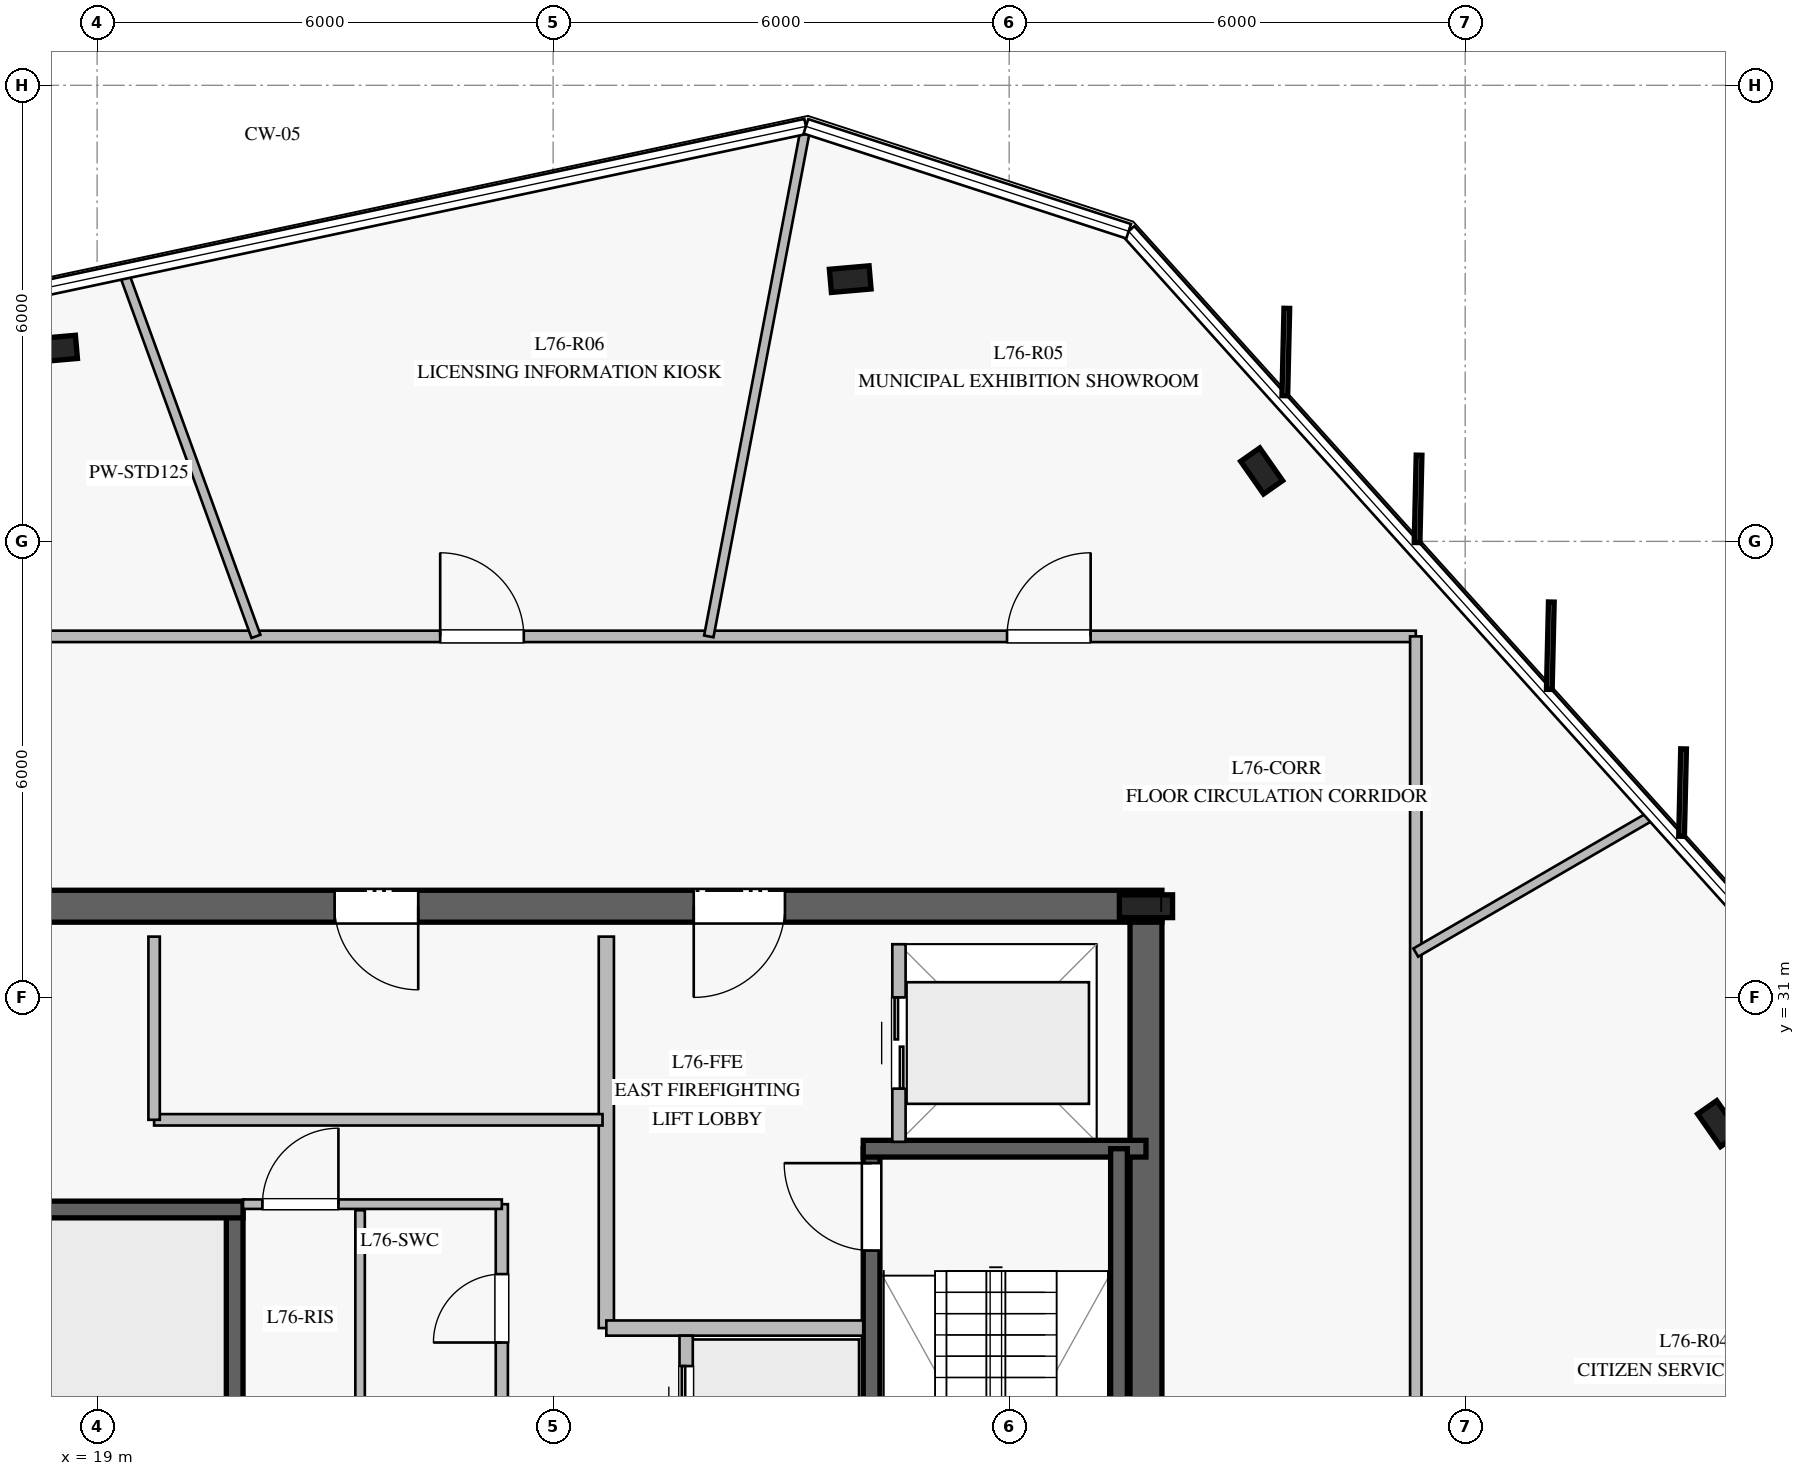
"""IFC4 building model, lengths in metres.
Left out: names, types, materials, properties, quantities, classifications, styles, units other than length and angle.
Written with IfcOpenShell. Run it as: python <this file> out.ifc"""

import sys

from ifc_helpers import new_model, si_unit, direction, frame, frame_2d, origin, origin_2d, place, context, subcontext, project, spatial, rectangle, i_section, extrude, element, fill, save


model = new_model("IFC4")
c1 = context("Model", 3, precision=1e-05, world=origin(), true_north=direction((0.0, 1.0)))
c2 = subcontext(c1, "Body", "Model", "MODEL_VIEW")
j1 = project(units=[si_unit("LENGTHUNIT", "METRE"), si_unit("PLANEANGLEUNIT", "RADIAN")], contexts=[c1])
p1 = place(None, origin())
s1 = spatial("IfcSite", under=j1, at=p1, CompositionType="ELEMENT")
p2 = place(p1, origin())
s2 = spatial("IfcBuilding", under=s1, at=p2, CompositionType="ELEMENT")
p3 = place(p2, frame((0.0, 0.0, 314.2)))
s3 = spatial("IfcBuildingStorey", under=s2, at=p3, CompositionType="ELEMENT", Elevation=314.2)
p4 = place(p3, frame((33.01, 32.2, 0.0), z_axis=(0.0, 0.0, 1.0), x_axis=(-1.0, 0.0, 0.0)))
e1 = element("IfcWall", 1, at=p4, inside=s3, PredefinedType="SHEAR", context=c2, shape_type="SweptSolid", body=[
    extrude(rectangle(XDim=16.02, YDim=0.42, at=frame_2d((8.01, 0.0))), origin(), (0.0, 0.0, 1.0), 3.74),
])
p5 = place(p4, frame((4.96, 0.0, 0.0)))
e2 = element("IfcOpeningElement", 2, at=p5, cuts=e1, PredefinedType="OPENING", context=c2, shape_type="SweptSolid", body=[
    extrude(rectangle(XDim=1.2, YDim=2.25, at=frame_2d((0.6, 1.125))), frame((0.0, 0.22, 0.0), z_axis=(0.0, -1.0, 0.0), x_axis=(1.0, 0.0, 0.0)), (0.0, 0.0, 1.0), 0.44),
])
p6 = place(p4, frame((9.785, 0.0, 0.0)))
e3 = element("IfcOpeningElement", 3, at=p6, cuts=e1, PredefinedType="OPENING", context=c2, shape_type="SweptSolid", body=[
    extrude(rectangle(XDim=1.1, YDim=2.2, at=frame_2d((0.55, 1.1))), frame((0.0, 0.22, 0.0), z_axis=(0.0, -1.0, 0.0), x_axis=(1.0, 0.0, 0.0)), (0.0, 0.0, 1.0), 0.44),
])
p7 = place(p3, frame((32.8, 18.01, 0.0), z_axis=(0.0, 0.0, 1.0), x_axis=(0.0, 1.0, 0.0)))
e4 = element("IfcWall", 4, at=p7, inside=s3, PredefinedType="SHEAR", context=c2, shape_type="SweptSolid", body=[
    extrude(rectangle(XDim=13.98, YDim=0.42, at=frame_2d((6.99, 0.0))), origin(), (0.0, 0.0, 1.0), 3.74),
])
p8 = place(p3, frame((32.8, 32.2, 0.0), z_axis=(0.0, 0.0, 1.0), x_axis=(1.0, 0.0, 0.0)))
e5 = element("IfcColumn", 5, at=p8, inside=s3, PredefinedType="COLUMN", context=c2, shape_type="SweptSolid", body=[
    extrude(i_section(OverallWidth=0.3, OverallDepth=0.7, WebThickness=0.017, FlangeThickness=0.032, at=origin_2d()), origin(), (0.0, 0.0, 1.0), 4.0),
])
p9 = place(p3, frame((20.81, 20.99, 0.0), z_axis=(0.0, 0.0, 1.0), x_axis=(0.0, 1.0, 0.0)))
e6 = element("IfcWall", 6, at=p9, inside=s3, PredefinedType="SOLIDWALL", context=c2, shape_type="SweptSolid", body=[
    extrude(rectangle(XDim=7.22, YDim=0.22, at=frame_2d((3.61, 0.0))), origin(), (0.0, 0.0, 1.0), 3.74),
])
p10 = place(p9, frame((0.18, 0.0, 0.0)))
e7 = element("IfcOpeningElement", 7, at=p10, cuts=e6, PredefinedType="OPENING", context=c2, shape_type="SweptSolid", body=[
    extrude(rectangle(XDim=1.15, YDim=2.2, at=frame_2d((0.575, 1.1))), frame((0.0, 0.12, 0.0), z_axis=(0.0, -1.0, 0.0), x_axis=(1.0, 0.0, 0.0)), (0.0, 0.0, 1.0), 0.24),
])
p11 = place(p3, frame((17.2, 28.21, 0.0), z_axis=(0.0, 0.0, 1.0), x_axis=(1.0, 0.0, 0.0)))
e8 = element("IfcWall", 8, at=p11, inside=s3, PredefinedType="SOLIDWALL", context=c2, shape_type="SweptSolid", body=[
    extrude(rectangle(XDim=3.72, YDim=0.22, at=frame_2d((1.86, 0.0))), origin(), (0.0, 0.0, 1.0), 3.74),
])
p12 = place(p3, frame((29.19, 21.79, 0.0), z_axis=(0.0, 0.0, 1.0), x_axis=(0.0, 1.0, 0.0)))
e9 = element("IfcWall", 9, at=p12, inside=s3, PredefinedType="SOLIDWALL", context=c2, shape_type="SweptSolid", body=[
    extrude(rectangle(XDim=7.22, YDim=0.22, at=frame_2d((3.61, 0.0))), origin(), (0.0, 0.0, 1.0), 3.74),
])
p13 = place(p12, frame((5.88, 0.0, 0.0)))
e10 = element("IfcOpeningElement", 10, at=p13, cuts=e9, PredefinedType="OPENING", context=c2, shape_type="SweptSolid", body=[
    extrude(rectangle(XDim=1.15, YDim=2.2, at=frame_2d((0.575, 1.1))), frame((0.0, 0.12, 0.0), z_axis=(0.0, -1.0, 0.0), x_axis=(1.0, 0.0, 0.0)), (0.0, 0.0, 1.0), 0.24),
])
p14 = place(p3, frame((29.08, 29.01, 0.0), z_axis=(0.0, 0.0, 1.0), x_axis=(1.0, 0.0, 0.0)))
e11 = element("IfcWall", 11, at=p14, inside=s3, PredefinedType="SOLIDWALL", context=c2, shape_type="SweptSolid", body=[
    extrude(rectangle(XDim=3.72, YDim=0.22, at=frame_2d((1.86, 0.0))), origin(), (0.0, 0.0, 1.0), 3.74),
])
p15 = place(p3, frame((32.445, 29.01, 0.0), z_axis=(0.0, 0.0, 1.0), x_axis=(0.0, -1.0, 0.0)))
e12 = element("IfcWall", 12, at=p15, inside=s3, PredefinedType="SOLIDWALL", context=c2, shape_type="SweptSolid", body=[
    extrude(rectangle(XDim=7.22, YDim=0.22, at=frame_2d((3.61, 0.0))), origin(), (0.0, 0.0, 1.0), 3.74),
])
for number, where, z_axis, x_axis in (
    (13, (28.909, 40.45, 0.0), (0.0, 0.0, 1.0), (0.996, 0.087, 0.0)),
    (14, (18.467, 39.536, 0.0), (0.0, 0.0, 1.0), (0.996, 0.087, 0.0)),
    (15, (40.334, 29.339, 0.0), (0.0, 0.0, 1.0), (-0.574, 0.819, 0.0)),
    (16, (34.322, 37.926, 0.0), (0.0, 0.0, 1.0), (-0.574, 0.819, 0.0)),
):
    element("IfcColumn", number, at=place(p3, frame(where, z_axis=z_axis, x_axis=x_axis)), inside=s3, PredefinedType="COLUMN", context=c2, shape_type="SweptSolid", body=[
        extrude(i_section(OverallWidth=0.306, OverallDepth=0.524, WebThickness=0.021, FlangeThickness=0.04, at=origin_2d()), origin(), (0.0, 0.0, 1.0), 4.0),
    ])
p16 = place(p3, frame((25.7, 26.65, 0.0), z_axis=(0.0, 0.0, 1.0), x_axis=(0.0, 1.0, 0.0)))
e17 = element("IfcWall", 17, at=p16, inside=s3, PredefinedType="PARTITIONING", context=c2, shape_type="SweptSolid", body=[
    extrude(rectangle(XDim=5.15, YDim=0.2, at=frame_2d((2.575, 0.0))), origin(), (0.0, 0.0, 1.0), 3.74),
])
p17 = place(p3, frame((25.7, 26.65, 0.0), z_axis=(0.0, 0.0, 1.0), x_axis=(1.0, 0.0, 0.0)))
e18 = element("IfcWall", 18, at=p17, inside=s3, PredefinedType="PARTITIONING", context=c2, shape_type="SweptSolid", body=[
    extrude(rectangle(XDim=3.38, YDim=0.2, at=frame_2d((1.69, 0.0))), origin(), (0.0, 0.0, 1.0), 3.74),
])
p18 = place(p3, frame((24.325, 23.35, 0.0), z_axis=(0.0, 0.0, 1.0), x_axis=(0.0, 1.0, 0.0)))
e19 = element("IfcWall", 19, at=p18, inside=s3, PredefinedType="PLUMBINGWALL", context=c2, shape_type="SweptSolid", body=[
    extrude(rectangle(XDim=4.93, YDim=0.16, at=frame_2d((2.465, 0.0))), origin(), (0.0, 0.0, 1.0), 3.74),
])
p19 = place(p18, frame((0.65, 0.0, 0.0)))
e20 = element("IfcOpeningElement", 20, at=p19, cuts=e19, PredefinedType="OPENING", context=c2, shape_type="SweptSolid", body=[
    extrude(rectangle(XDim=0.95, YDim=2.1, at=frame_2d((0.475, 1.05))), frame((0.0, 0.09, 0.0), z_axis=(0.0, -1.0, 0.0), x_axis=(1.0, 0.0, 0.0)), (0.0, 0.0, 1.0), 0.18),
])
p20 = place(p18, frame((3.11, 0.0, 0.0)))
e21 = element("IfcOpeningElement", 21, at=p20, cuts=e19, PredefinedType="OPENING", context=c2, shape_type="SweptSolid", body=[
    extrude(rectangle(XDim=0.9, YDim=2.1, at=frame_2d((0.45, 1.05))), frame((0.0, 0.09, 0.0), z_axis=(0.0, -1.0, 0.0), x_axis=(1.0, 0.0, 0.0)), (0.0, 0.0, 1.0), 0.18),
])
p21 = place(p3, frame((20.92, 28.28, 0.0), z_axis=(0.0, 0.0, 1.0), x_axis=(1.0, 0.0, 0.0)))
e22 = element("IfcWall", 22, at=p21, inside=s3, PredefinedType="PARTITIONING", context=c2, shape_type="SweptSolid", body=[
    extrude(rectangle(XDim=3.405, YDim=0.125, at=frame_2d((1.703, 0.0))), origin(), (0.0, 0.0, 1.0), 3.74),
])
p22 = place(p21, frame((0.255, 0.0, 0.0)))
e23 = element("IfcOpeningElement", 23, at=p22, cuts=e22, PredefinedType="OPENING", context=c2, shape_type="SweptSolid", body=[
    extrude(rectangle(XDim=1.0, YDim=2.15, at=frame_2d((0.5, 1.075))), frame((0.0, 0.073, 0.0), z_axis=(0.0, -1.0, 0.0), x_axis=(1.0, 0.0, 0.0)), (0.0, 0.0, 1.0), 0.145),
])
p23 = place(p3, frame((22.46, 25.62, 0.0), z_axis=(0.0, 0.0, 1.0), x_axis=(0.0, 1.0, 0.0)))
e24 = element("IfcWall", 24, at=p23, inside=s3, PredefinedType="PARTITIONING", context=c2, shape_type="SweptSolid", body=[
    extrude(rectangle(XDim=2.58, YDim=0.125, at=frame_2d((1.29, 0.0))), origin(), (0.0, 0.0, 1.0), 3.74),
])
p24 = place(p3, frame((19.75, 29.39, 0.0), z_axis=(0.0, 0.0, 1.0), x_axis=(1.0, 0.0, 0.0)))
e25 = element("IfcWall", 25, at=p24, inside=s3, PredefinedType="PARTITIONING", context=c2, shape_type="SweptSolid", body=[
    extrude(rectangle(XDim=5.9, YDim=0.15, at=frame_2d((2.95, 0.0))), origin(), (0.0, 0.0, 1.0), 3.74),
])
p25 = place(p3, frame((19.75, 29.39, 0.0), z_axis=(0.0, 0.0, 1.0), x_axis=(0.0, 1.0, 0.0)))
e26 = element("IfcWall", 26, at=p25, inside=s3, PredefinedType="PARTITIONING", context=c2, shape_type="SweptSolid", body=[
    extrude(rectangle(XDim=2.41, YDim=0.15, at=frame_2d((1.205, 0.0))), origin(), (0.0, 0.0, 1.0), 3.74),
])
p26 = place(p3, frame((26.75, 24.65, 0.0), z_axis=(0.0, 0.0, 1.0), x_axis=(0.0, 1.0, 0.0)))
e27 = element("IfcWall", 27, at=p26, inside=s3, PredefinedType="PARTITIONING", context=c2, shape_type="SweptSolid", body=[
    extrude(rectangle(XDim=1.9, YDim=0.175, at=frame_2d((0.95, 0.0))), origin(), (0.0, 0.0, 1.0), 3.74),
])
p27 = place(p26, frame((0.4, 0.0, 0.0)))
e28 = element("IfcOpeningElement", 28, at=p27, cuts=e27, PredefinedType="OPENING", context=c2, shape_type="SweptSolid", body=[
    extrude(rectangle(XDim=1.1, YDim=2.2, at=frame_2d((0.55, 1.1))), frame((0.0, 0.098, 0.0), z_axis=(0.0, -1.0, 0.0), x_axis=(1.0, 0.0, 0.0)), (0.0, 0.0, 1.0), 0.195),
])
p28 = place(p3, frame((29.55, 29.1, 0.0), z_axis=(0.0, 0.0, 1.0), x_axis=(0.0, 1.0, 0.0)))
e29 = element("IfcWall", 29, at=p28, inside=s3, PredefinedType="PARTITIONING", context=c2, shape_type="SweptSolid", body=[
    extrude(rectangle(XDim=2.6, YDim=0.175, at=frame_2d((1.3, 0.0))), origin(), (0.0, 0.0, 1.0), 3.74),
])
p29 = place(p28, frame((0.7, 0.0, 0.0)))
e30 = element("IfcOpeningElement", 30, at=p29, cuts=e29, PredefinedType="OPENING", context=c2, shape_type="SweptSolid", body=[
    extrude(rectangle(XDim=1.2, YDim=2.2, at=frame_2d((0.6, 1.1))), frame((0.0, 0.098, 0.0), z_axis=(0.0, -1.0, 0.0), x_axis=(1.0, 0.0, 0.0)), (0.0, 0.0, 1.0), 0.195),
])
p30 = place(p3, frame((13.65, 35.75, 0.0), z_axis=(0.0, 0.0, 1.0), x_axis=(1.0, 0.0, 0.0)))
e31 = element("IfcWall", 31, at=p30, inside=s3, PredefinedType="PARTITIONING", context=c2, shape_type="SweptSolid", body=[
    extrude(rectangle(XDim=22.7, YDim=0.15, at=frame_2d((11.35, 0.0))), origin(), (0.0, 0.0, 1.0), 3.24),
])
p31 = place(p30, frame((17.322, 0.0, 0.0)))
e32 = element("IfcOpeningElement", 32, at=p31, cuts=e31, PredefinedType="OPENING", context=c2, shape_type="SweptSolid", body=[
    extrude(rectangle(XDim=1.1, YDim=2.2, at=frame_2d((0.55, 1.1))), frame((0.0, 0.085, 0.0), z_axis=(0.0, -1.0, 0.0), x_axis=(1.0, 0.0, 0.0)), (0.0, 0.0, 1.0), 0.17),
])
p32 = place(p30, frame((9.864, 0.0, 0.0)))
e33 = element("IfcOpeningElement", 33, at=p32, cuts=e31, PredefinedType="OPENING", context=c2, shape_type="SweptSolid", body=[
    extrude(rectangle(XDim=1.1, YDim=2.2, at=frame_2d((0.55, 1.1))), frame((0.0, 0.085, 0.0), z_axis=(0.0, -1.0, 0.0), x_axis=(1.0, 0.0, 0.0)), (0.0, 0.0, 1.0), 0.17),
])
p33 = place(p30, frame((3.34, 0.0, 0.0)))
e34 = element("IfcOpeningElement", 34, at=p33, cuts=e31, PredefinedType="OPENING", context=c2, shape_type="SweptSolid", body=[
    extrude(rectangle(XDim=1.1, YDim=2.2, at=frame_2d((0.55, 1.1))), frame((0.0, 0.085, 0.0), z_axis=(0.0, -1.0, 0.0), x_axis=(1.0, 0.0, 0.0)), (0.0, 0.0, 1.0), 0.17),
])
p34 = place(p3, frame((36.35, 35.75, 0.0), z_axis=(0.0, 0.0, 1.0), x_axis=(0.0, -1.0, 0.0)))
e35 = element("IfcWall", 35, at=p34, inside=s3, PredefinedType="PARTITIONING", context=c2, shape_type="SweptSolid", body=[
    extrude(rectangle(XDim=21.5, YDim=0.15, at=frame_2d((10.75, 0.0))), origin(), (0.0, 0.0, 1.0), 3.24),
])
p35 = place(p34, frame((18.673, 0.0, 0.0)))
e36 = element("IfcOpeningElement", 36, at=p35, cuts=e35, PredefinedType="OPENING", context=c2, shape_type="SweptSolid", body=[
    extrude(rectangle(XDim=1.1, YDim=2.2, at=frame_2d((0.55, 1.1))), frame((0.0, 0.085, 0.0), z_axis=(0.0, -1.0, 0.0), x_axis=(1.0, 0.0, 0.0)), (0.0, 0.0, 1.0), 0.17),
])
p36 = place(p34, frame((10.163, 0.0, 0.0)))
e37 = element("IfcOpeningElement", 37, at=p36, cuts=e35, PredefinedType="OPENING", context=c2, shape_type="SweptSolid", body=[
    extrude(rectangle(XDim=1.1, YDim=2.2, at=frame_2d((0.55, 1.1))), frame((0.0, 0.085, 0.0), z_axis=(0.0, -1.0, 0.0), x_axis=(1.0, 0.0, 0.0)), (0.0, 0.0, 1.0), 0.17),
])
p37 = place(p3, frame((21.09, 35.75, 0.0), z_axis=(0.0, 0.0, 1.0), x_axis=(-0.341685321623, 0.939814418376, 0.0)))
e38 = element("IfcWall", 38, at=p37, inside=s3, PredefinedType="PARTITIONING", context=c2, shape_type="SweptSolid", body=[
    extrude(rectangle(XDim=5.092, YDim=0.125, at=frame_2d((2.546, 0.0))), origin(), (0.0, 0.0, 1.0), 3.24),
])
p38 = place(p3, frame((36.35, 31.59, 0.0), z_axis=(0.0, 0.0, 1.0), x_axis=(0.864909440523, 0.50192794273, 0.0)))
e39 = element("IfcWall", 39, at=p38, inside=s3, PredefinedType="PARTITIONING", context=c2, shape_type="SweptSolid", body=[
    extrude(rectangle(XDim=3.604, YDim=0.125, at=frame_2d((1.802, 0.0))), origin(), (0.0, 0.0, 1.0), 3.24),
])
p39 = place(p3, frame((27.048, 35.75, 0.0), z_axis=(0.0, 0.0, 1.0), x_axis=(0.187089059339, 0.982342956342, 0.0)))
e40 = element("IfcWall", 40, at=p39, inside=s3, PredefinedType="PARTITIONING", context=c2, shape_type="SweptSolid", body=[
    extrude(rectangle(XDim=6.814, YDim=0.125, at=frame_2d((3.407, 0.0))), origin(), (0.0, 0.0, 1.0), 3.24),
])
p40 = place(p13, origin())
e41 = element("IfcDoor", 41, at=p40, inside=s3, OperationType="SINGLE_SWING_RIGHT", PredefinedType="DOOR", context=c2, shape_type="SweptSolid", body=[
    extrude(rectangle(XDim=1.15, YDim=2.2, at=frame_2d((0.575, 1.1))), frame((0.0, 0.025, 0.0), z_axis=(0.0, -1.0, 0.0), x_axis=(1.0, 0.0, 0.0)), (0.0, 0.0, 1.0), 0.05),
])
fill(e10, e41)
p41 = place(p5, origin())
e42 = element("IfcDoor", 42, at=p41, inside=s3, OperationType="SINGLE_SWING_RIGHT", PredefinedType="DOOR", context=c2, shape_type="SweptSolid", body=[
    extrude(rectangle(XDim=1.2, YDim=2.25, at=frame_2d((0.6, 1.125))), frame((0.0, 0.025, 0.0), z_axis=(0.0, -1.0, 0.0), x_axis=(1.0, 0.0, 0.0)), (0.0, 0.0, 1.0), 0.05),
])
fill(e2, e42)
p42 = place(p22, origin())
e43 = element("IfcDoor", 43, at=p42, inside=s3, OperationType="SINGLE_SWING_RIGHT", PredefinedType="DOOR", context=c2, shape_type="SweptSolid", body=[
    extrude(rectangle(XDim=1.0, YDim=2.15, at=frame_2d((0.5, 1.075))), frame((0.0, 0.025, 0.0), z_axis=(0.0, -1.0, 0.0), x_axis=(1.0, 0.0, 0.0)), (0.0, 0.0, 1.0), 0.05),
])
fill(e23, e43)
p43 = place(p20, origin())
e44 = element("IfcDoor", 44, at=p43, inside=s3, OperationType="SINGLE_SWING_LEFT", PredefinedType="DOOR", context=c2, shape_type="SweptSolid", body=[
    extrude(rectangle(XDim=0.9, YDim=2.1, at=frame_2d((0.45, 1.05))), frame((0.0, 0.025, 0.0), z_axis=(0.0, -1.0, 0.0), x_axis=(1.0, 0.0, 0.0)), (0.0, 0.0, 1.0), 0.05),
])
fill(e21, e44)
p44 = place(p6, origin())
e45 = element("IfcDoor", 45, at=p44, inside=s3, OperationType="SINGLE_SWING_LEFT", PredefinedType="DOOR", context=c2, shape_type="SweptSolid", body=[
    extrude(rectangle(XDim=1.1, YDim=2.2, at=frame_2d((0.55, 1.1))), frame((0.0, 0.025, 0.0), z_axis=(0.0, -1.0, 0.0), x_axis=(1.0, 0.0, 0.0)), (0.0, 0.0, 1.0), 0.05),
])
fill(e3, e45)
p45 = place(p27, origin())
e46 = element("IfcDoor", 46, at=p45, inside=s3, OperationType="DOUBLE_DOOR_SLIDING", PredefinedType="DOOR", context=c2, shape_type="SweptSolid", body=[
    extrude(rectangle(XDim=1.1, YDim=2.2, at=frame_2d((0.55, 1.1))), frame((0.0, 0.025, 0.0), z_axis=(0.0, -1.0, 0.0), x_axis=(1.0, 0.0, 0.0)), (0.0, 0.0, 1.0), 0.05),
])
fill(e28, e46)
p46 = place(p29, origin())
e47 = element("IfcDoor", 47, at=p46, inside=s3, OperationType="DOUBLE_DOOR_SLIDING", PredefinedType="DOOR", context=c2, shape_type="SweptSolid", body=[
    extrude(rectangle(XDim=1.2, YDim=2.2, at=frame_2d((0.6, 1.1))), frame((0.0, 0.025, 0.0), z_axis=(0.0, -1.0, 0.0), x_axis=(1.0, 0.0, 0.0)), (0.0, 0.0, 1.0), 0.05),
])
fill(e30, e47)
p47 = place(p31, origin())
e48 = element("IfcDoor", 48, at=p47, inside=s3, OperationType="SINGLE_SWING_RIGHT", PredefinedType="DOOR", context=c2, shape_type="SweptSolid", body=[
    extrude(rectangle(XDim=1.1, YDim=2.2, at=frame_2d((0.55, 1.1))), frame((0.0, 0.025, 0.0), z_axis=(0.0, -1.0, 0.0), x_axis=(1.0, 0.0, 0.0)), (0.0, 0.0, 1.0), 0.05),
])
fill(e32, e48)
p48 = place(p32, origin())
e49 = element("IfcDoor", 49, at=p48, inside=s3, OperationType="SINGLE_SWING_LEFT", PredefinedType="DOOR", context=c2, shape_type="SweptSolid", body=[
    extrude(rectangle(XDim=1.1, YDim=2.2, at=frame_2d((0.55, 1.1))), frame((0.0, 0.025, 0.0), z_axis=(0.0, -1.0, 0.0), x_axis=(1.0, 0.0, 0.0)), (0.0, 0.0, 1.0), 0.05),
])
fill(e33, e49)
save(model, sys.argv[1])
